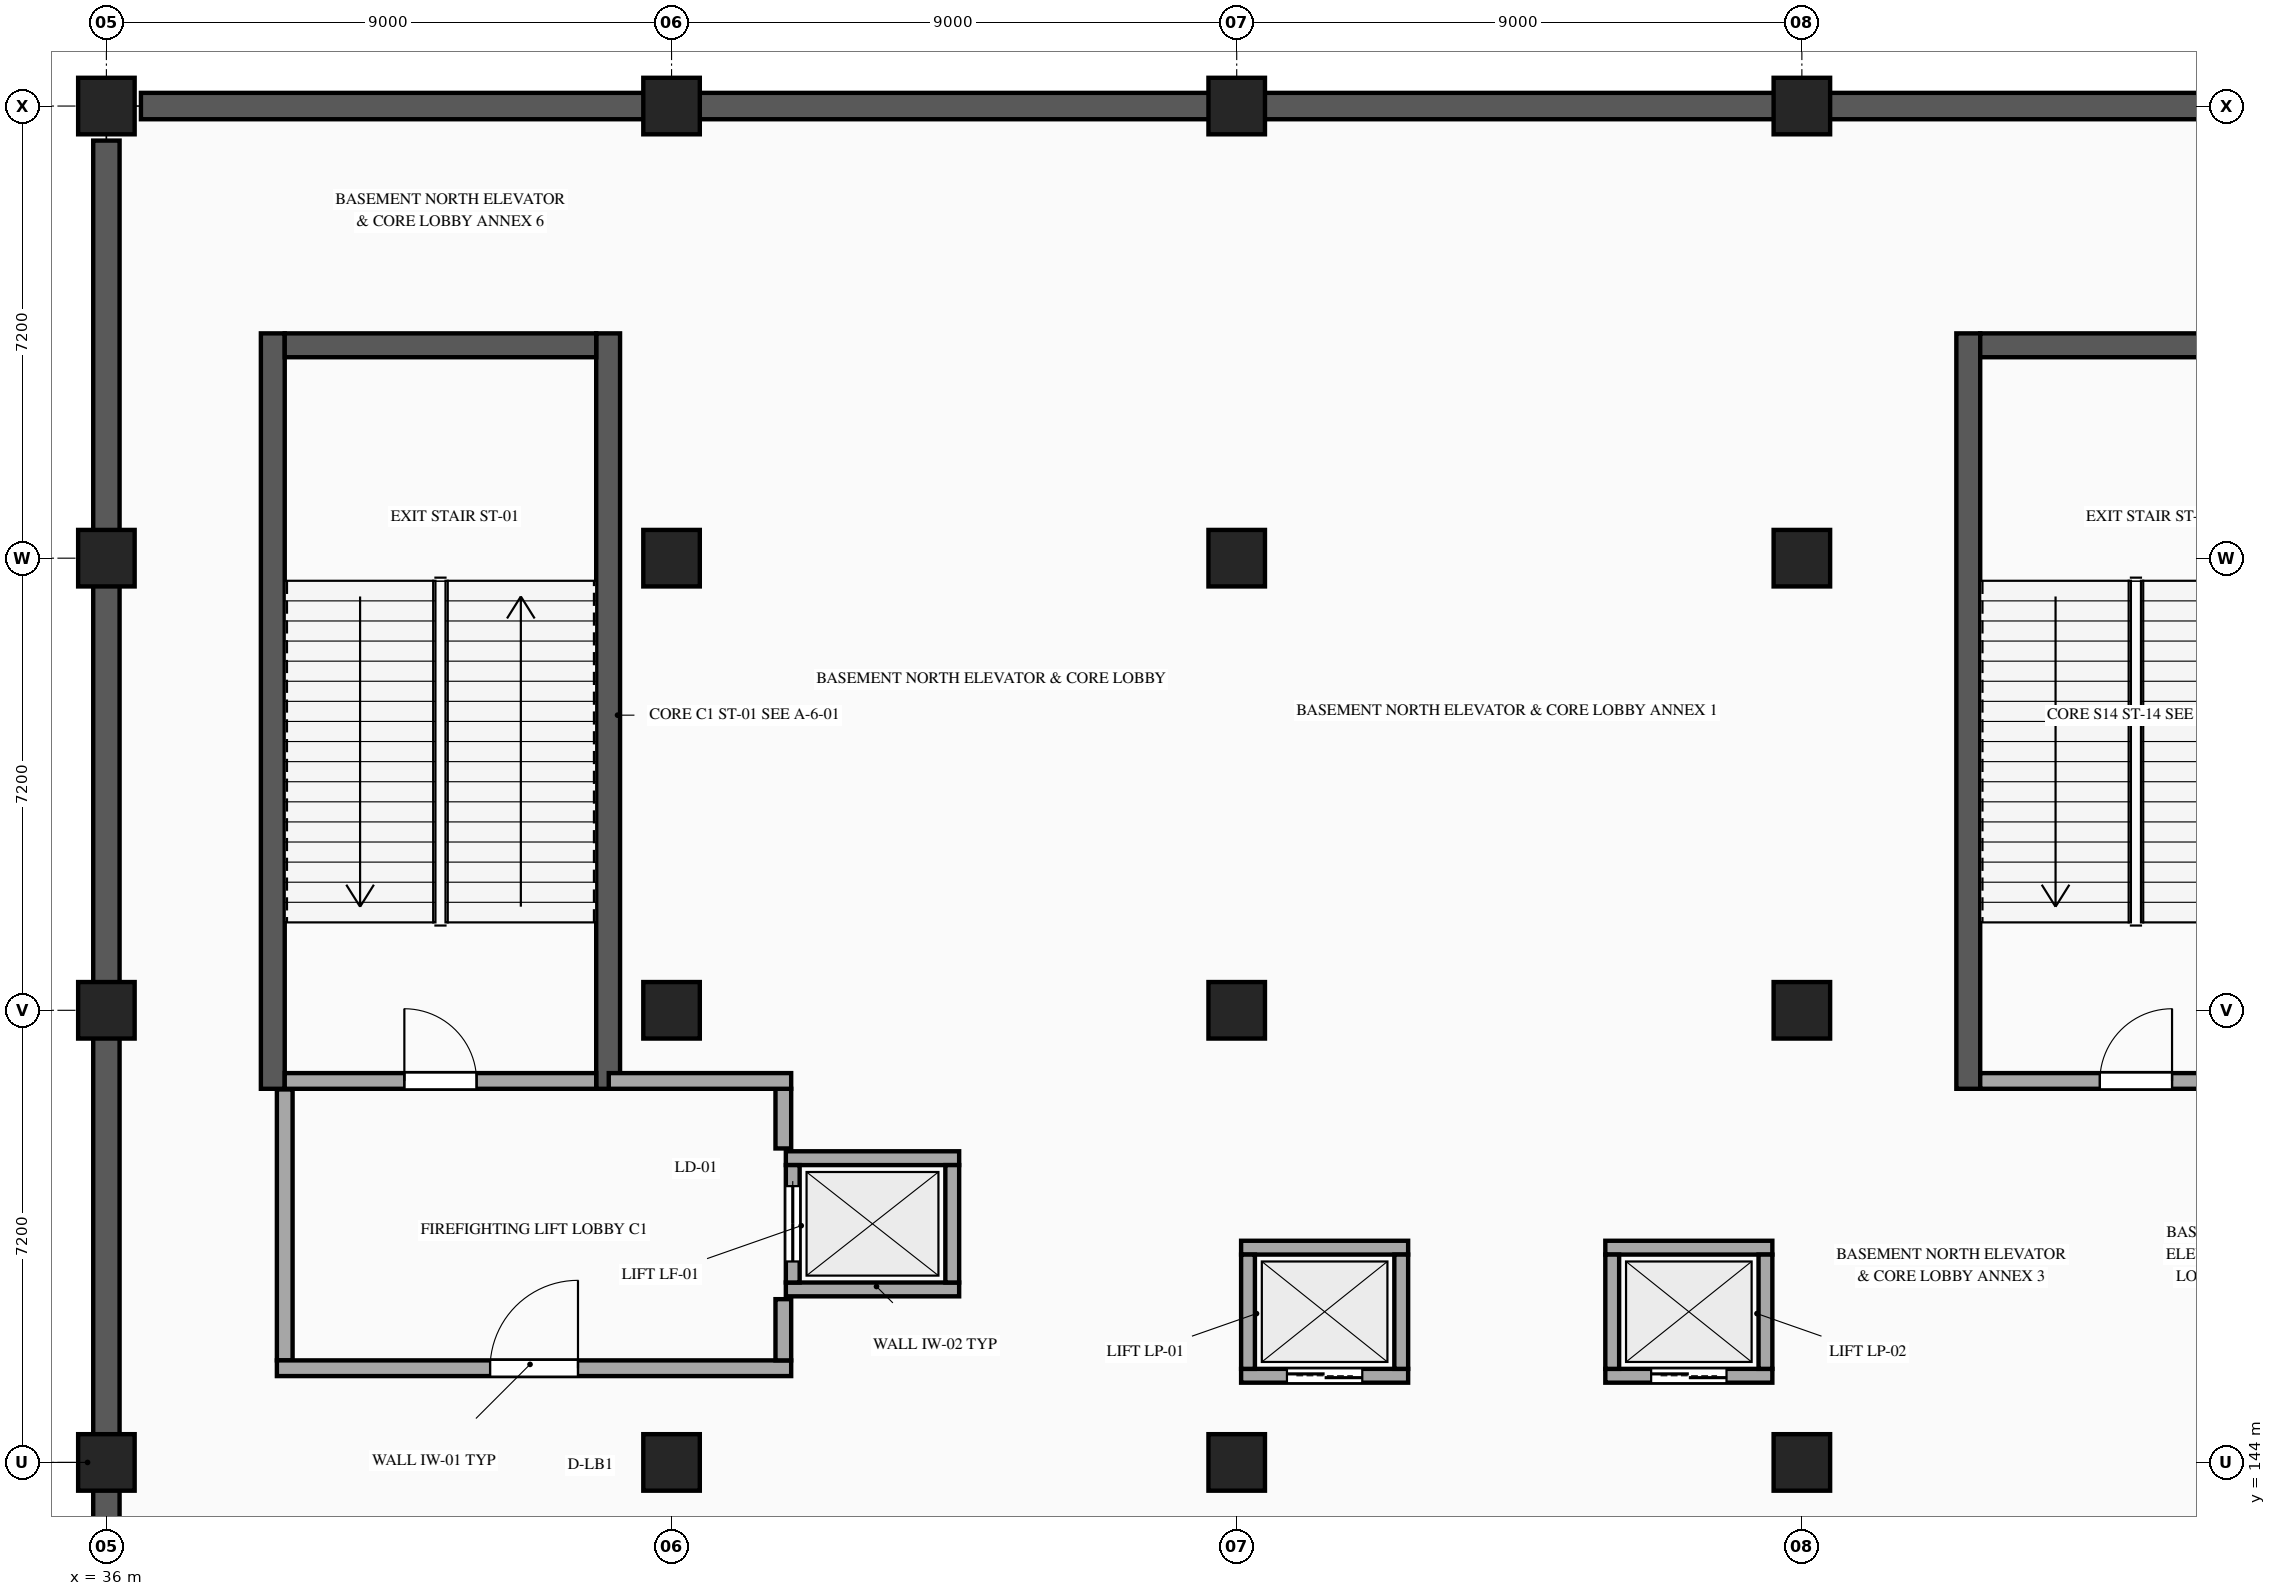
"""IFC4 building model, lengths in metres.
Left out: names, types, materials, properties, quantities, classifications, styles, units other than length and angle.
Written with IfcOpenShell. Run it as: python <this file> out.ifc"""

import sys

from ifc_helpers import new_model, si_unit, direction, frame, frame_2d, origin, origin_2d, place, context, subcontext, project, spatial, rectangle, extrude, element, fill, save


model = new_model("IFC4")
c1 = context("Model", 3, precision=1e-05, world=origin(), true_north=direction((0.0, 1.0)))
c2 = subcontext(c1, "Body", "Model", "MODEL_VIEW")
j1 = project(units=[si_unit("LENGTHUNIT", "METRE"), si_unit("PLANEANGLEUNIT", "RADIAN")], contexts=[c1])
p1 = place(None, origin())
s1 = spatial("IfcSite", under=j1, at=p1, CompositionType="ELEMENT")
p2 = place(p1, origin())
s2 = spatial("IfcBuilding", under=s1, at=p2, CompositionType="ELEMENT")
p3 = place(p2, frame((0.0, 0.0, -5.4)))
s3 = spatial("IfcBuildingStorey", under=s2, at=p3, CompositionType="ELEMENT", Elevation=-5.4)
for number, where, z_axis, x_axis in (
    (1, (36.0, 144.0, 0.0), (0.0, 0.0, 1.0), (1.0, 0.0, 0.0)),
    (2, (36.0, 151.2, 0.0), (0.0, 0.0, 1.0), (1.0, 0.0, 0.0)),
    (3, (36.0, 158.4, 0.0), (0.0, 0.0, 1.0), (1.0, 0.0, 0.0)),
    (4, (36.0, 165.6, 0.0), (0.0, 0.0, 1.0), (1.0, 0.0, 0.0)),
    (5, (45.0, 144.0, 0.0), (0.0, 0.0, 1.0), (1.0, 0.0, 0.0)),
    (6, (45.0, 151.2, 0.0), (0.0, 0.0, 1.0), (1.0, 0.0, 0.0)),
    (7, (45.0, 158.4, 0.0), (0.0, 0.0, 1.0), (1.0, 0.0, 0.0)),
    (8, (45.0, 165.6, 0.0), (0.0, 0.0, 1.0), (1.0, 0.0, 0.0)),
    (9, (54.0, 144.0, 0.0), (0.0, 0.0, 1.0), (1.0, 0.0, 0.0)),
    (10, (54.0, 151.2, 0.0), (0.0, 0.0, 1.0), (1.0, 0.0, 0.0)),
    (11, (54.0, 158.4, 0.0), (0.0, 0.0, 1.0), (1.0, 0.0, 0.0)),
    (12, (54.0, 165.6, 0.0), (0.0, 0.0, 1.0), (1.0, 0.0, 0.0)),
    (13, (63.0, 144.0, 0.0), (0.0, 0.0, 1.0), (1.0, 0.0, 0.0)),
    (14, (63.0, 151.2, 0.0), (0.0, 0.0, 1.0), (1.0, 0.0, 0.0)),
    (15, (63.0, 158.4, 0.0), (0.0, 0.0, 1.0), (1.0, 0.0, 0.0)),
    (16, (63.0, 165.6, 0.0), (0.0, 0.0, 1.0), (1.0, 0.0, 0.0)),
):
    element("IfcColumn", number, at=place(p3, frame(where, z_axis=z_axis, x_axis=x_axis)), inside=s3, PredefinedType="COLUMN", context=c2, shape_type="SweptSolid", body=[
        extrude(rectangle(XDim=0.9, YDim=0.9, at=origin_2d()), origin(), (0.0, 0.0, 1.0), 5.4),
    ])
p4 = place(p3, frame((36.0, 122.95, 0.0), z_axis=(0.0, 0.0, 1.0), x_axis=(0.0, 1.0, 0.0)))
e17 = element("IfcWall", 17, at=p4, inside=s3, PredefinedType="USERDEFINED", context=c2, shape_type="SweptSolid", body=[
    extrude(rectangle(XDim=42.1, YDim=0.42, at=frame_2d((21.05, 0.0))), origin(), (0.0, 0.0, 1.0), 4.08),
])
p5 = place(p3, frame((36.55, 165.6, 0.0), z_axis=(0.0, 0.0, 1.0), x_axis=(1.0, 0.0, 0.0)))
e18 = element("IfcWall", 18, at=p5, inside=s3, PredefinedType="USERDEFINED", context=c2, shape_type="SweptSolid", body=[
    extrude(rectangle(XDim=61.9, YDim=0.42, at=frame_2d((30.95, 0.0))), origin(), (0.0, 0.0, 1.0), 4.08),
])
for number, where, z_axis, x_axis in (
    (19, (38.65, 149.95, 0.0), (0.0, 0.0, 1.0), (0.0, 1.0, 0.0)),
    (20, (43.99, 161.98, 0.0), (0.0, 0.0, 1.0), (0.0, -1.0, 0.0)),
):
    element("IfcWall", number, at=place(p3, frame(where, z_axis=z_axis, x_axis=x_axis)), inside=s3, PredefinedType="SHEAR", context=c2, shape_type="SweptSolid", body=[
        extrude(rectangle(XDim=12.03, YDim=0.38, at=frame_2d((6.015, 0.0))), origin(), (0.0, 0.0, 1.0), 5.08),
    ])
p6 = place(p3, frame((38.84, 161.79, 0.0), z_axis=(0.0, 0.0, 1.0), x_axis=(1.0, 0.0, 0.0)))
e21 = element("IfcWall", 21, at=p6, inside=s3, PredefinedType="SHEAR", context=c2, shape_type="SweptSolid", body=[
    extrude(rectangle(XDim=4.96, YDim=0.38, at=frame_2d((2.48, 0.0))), origin(), (0.0, 0.0, 1.0), 5.08),
])
p7 = place(p3, frame((65.65, 149.95, 0.0), z_axis=(0.0, 0.0, 1.0), x_axis=(0.0, 1.0, 0.0)))
e22 = element("IfcWall", 22, at=p7, inside=s3, PredefinedType="SHEAR", context=c2, shape_type="SweptSolid", body=[
    extrude(rectangle(XDim=12.03, YDim=0.38, at=frame_2d((6.015, 0.0))), origin(), (0.0, 0.0, 1.0), 5.08),
])
p8 = place(p3, frame((65.84, 161.79, 0.0), z_axis=(0.0, 0.0, 1.0), x_axis=(1.0, 0.0, 0.0)))
e23 = element("IfcWall", 23, at=p8, inside=s3, PredefinedType="SHEAR", context=c2, shape_type="SweptSolid", body=[
    extrude(rectangle(XDim=4.96, YDim=0.38, at=frame_2d((2.48, 0.0))), origin(), (0.0, 0.0, 1.0), 5.08),
])
p9 = place(p3, frame((38.84, 150.075, 0.0), z_axis=(0.0, 0.0, 1.0), x_axis=(1.0, 0.0, 0.0)))
e24 = element("IfcWall", 24, at=p9, inside=s3, PredefinedType="STANDARD", context=c2, shape_type="SweptSolid", body=[
    extrude(rectangle(XDim=4.96, YDim=0.25, at=frame_2d((2.48, 0.0))), origin(), (0.0, 0.0, 1.0), 4.95),
])
p10 = place(p9, frame((1.905, 0.0, 0.0)))
e25 = element("IfcOpeningElement", 25, at=p10, cuts=e24, PredefinedType="OPENING", context=c2, shape_type="SweptSolid", body=[
    extrude(rectangle(XDim=1.15, YDim=2.2, at=frame_2d((0.575, 1.1))), frame((0.0, 0.135, 0.0), z_axis=(0.0, -1.0, 0.0), x_axis=(1.0, 0.0, 0.0)), (0.0, 0.0, 1.0), 0.27),
])
for number, where, z_axis, x_axis in (
    (26, (46.82, 146.755, 0.0), (0.0, 0.0, 1.0), (1.0, 0.0, 0.0)),
    (27, (49.58, 148.845, 0.0), (0.0, 0.0, 1.0), (-1.0, 0.0, 0.0)),
):
    element("IfcWall", number, at=place(p3, frame(where, z_axis=z_axis, x_axis=x_axis)), inside=s3, PredefinedType="STANDARD", context=c2, shape_type="SweptSolid", body=[
        extrude(rectangle(XDim=2.76, YDim=0.22, at=frame_2d((1.38, 0.0))), origin(), (0.0, 0.0, 1.0), 4.95),
    ])
p11 = place(p3, frame((46.93, 148.735, 0.0), z_axis=(0.0, 0.0, 1.0), x_axis=(0.0, -1.0, 0.0)))
e28 = element("IfcWall", 28, at=p11, inside=s3, PredefinedType="STANDARD", context=c2, shape_type="SweptSolid", body=[
    extrude(rectangle(XDim=1.87, YDim=0.22, at=frame_2d((0.935, 0.0))), origin(), (0.0, 0.0, 1.0), 4.95),
])
p12 = place(p11, frame((0.335, 0.0, 0.0)))
e29 = element("IfcOpeningElement", 29, at=p12, cuts=e28, PredefinedType="OPENING", context=c2, shape_type="SweptSolid", body=[
    extrude(rectangle(XDim=1.2, YDim=2.2, at=frame_2d((0.6, 1.1))), frame((0.0, 0.12, 0.0), z_axis=(0.0, -1.0, 0.0), x_axis=(1.0, 0.0, 0.0)), (0.0, 0.0, 1.0), 0.24),
])
p13 = place(p3, frame((49.47, 146.865, 0.0), z_axis=(0.0, 0.0, 1.0), x_axis=(0.0, 1.0, 0.0)))
e30 = element("IfcWall", 30, at=p13, inside=s3, PredefinedType="STANDARD", context=c2, shape_type="SweptSolid", body=[
    extrude(rectangle(XDim=1.87, YDim=0.22, at=frame_2d((0.935, 0.0))), origin(), (0.0, 0.0, 1.0), 4.95),
])
p14 = place(p3, frame((54.07, 145.38, 0.0), z_axis=(0.0, 0.0, 1.0), x_axis=(1.0, 0.0, 0.0)))
e31 = element("IfcWall", 31, at=p14, inside=s3, PredefinedType="STANDARD", context=c2, shape_type="SweptSolid", body=[
    extrude(rectangle(XDim=2.66, YDim=0.22, at=frame_2d((1.33, 0.0))), origin(), (0.0, 0.0, 1.0), 4.397),
])
p15 = place(p14, frame((0.73, 0.0, 0.0)))
e32 = element("IfcOpeningElement", 32, at=p15, cuts=e31, PredefinedType="OPENING", context=c2, shape_type="SweptSolid", body=[
    extrude(rectangle(XDim=1.2, YDim=2.2, at=frame_2d((0.6, 1.1))), frame((0.0, 0.12, 0.0), z_axis=(0.0, -1.0, 0.0), x_axis=(1.0, 0.0, 0.0)), (0.0, 0.0, 1.0), 0.24),
])
p16 = place(p3, frame((56.73, 147.42, 0.0), z_axis=(0.0, 0.0, 1.0), x_axis=(-1.0, 0.0, 0.0)))
e33 = element("IfcWall", 33, at=p16, inside=s3, PredefinedType="STANDARD", context=c2, shape_type="SweptSolid", body=[
    extrude(rectangle(XDim=2.66, YDim=0.22, at=frame_2d((1.33, 0.0))), origin(), (0.0, 0.0, 1.0), 4.397),
])
for number, where, z_axis, x_axis in (
    (34, (54.18, 147.31, 0.0), (0.0, 0.0, 1.0), (0.0, -1.0, 0.0)),
    (35, (56.62, 145.49, 0.0), (0.0, 0.0, 1.0), (0.0, 1.0, 0.0)),
):
    element("IfcWall", number, at=place(p3, frame(where, z_axis=z_axis, x_axis=x_axis)), inside=s3, PredefinedType="STANDARD", context=c2, shape_type="SweptSolid", body=[
        extrude(rectangle(XDim=1.82, YDim=0.22, at=frame_2d((0.91, 0.0))), origin(), (0.0, 0.0, 1.0), 4.397),
    ])
p17 = place(p3, frame((59.87, 145.38, 0.0), z_axis=(0.0, 0.0, 1.0), x_axis=(1.0, 0.0, 0.0)))
e36 = element("IfcWall", 36, at=p17, inside=s3, PredefinedType="STANDARD", context=c2, shape_type="SweptSolid", body=[
    extrude(rectangle(XDim=2.66, YDim=0.22, at=frame_2d((1.33, 0.0))), origin(), (0.0, 0.0, 1.0), 4.95),
])
p18 = place(p17, frame((0.73, 0.0, 0.0)))
e37 = element("IfcOpeningElement", 37, at=p18, cuts=e36, PredefinedType="OPENING", context=c2, shape_type="SweptSolid", body=[
    extrude(rectangle(XDim=1.2, YDim=2.2, at=frame_2d((0.6, 1.1))), frame((0.0, 0.12, 0.0), z_axis=(0.0, -1.0, 0.0), x_axis=(1.0, 0.0, 0.0)), (0.0, 0.0, 1.0), 0.24),
])
p19 = place(p3, frame((62.53, 147.42, 0.0), z_axis=(0.0, 0.0, 1.0), x_axis=(-1.0, 0.0, 0.0)))
e38 = element("IfcWall", 38, at=p19, inside=s3, PredefinedType="STANDARD", context=c2, shape_type="SweptSolid", body=[
    extrude(rectangle(XDim=2.66, YDim=0.22, at=frame_2d((1.33, 0.0))), origin(), (0.0, 0.0, 1.0), 4.95),
])
for number, where, z_axis, x_axis in (
    (39, (59.98, 147.31, 0.0), (0.0, 0.0, 1.0), (0.0, -1.0, 0.0)),
    (40, (62.42, 145.49, 0.0), (0.0, 0.0, 1.0), (0.0, 1.0, 0.0)),
):
    element("IfcWall", number, at=place(p3, frame(where, z_axis=z_axis, x_axis=x_axis)), inside=s3, PredefinedType="STANDARD", context=c2, shape_type="SweptSolid", body=[
        extrude(rectangle(XDim=1.82, YDim=0.22, at=frame_2d((0.91, 0.0))), origin(), (0.0, 0.0, 1.0), 4.95),
    ])
p20 = place(p3, frame((65.84, 150.075, 0.0), z_axis=(0.0, 0.0, 1.0), x_axis=(1.0, 0.0, 0.0)))
e41 = element("IfcWall", 41, at=p20, inside=s3, PredefinedType="STANDARD", context=c2, shape_type="SweptSolid", body=[
    extrude(rectangle(XDim=4.96, YDim=0.25, at=frame_2d((2.48, 0.0))), origin(), (0.0, 0.0, 1.0), 4.95),
])
p21 = place(p20, frame((1.905, 0.0, 0.0)))
e42 = element("IfcOpeningElement", 42, at=p21, cuts=e41, PredefinedType="OPENING", context=c2, shape_type="SweptSolid", body=[
    extrude(rectangle(XDim=1.15, YDim=2.2, at=frame_2d((0.575, 1.1))), frame((0.0, 0.135, 0.0), z_axis=(0.0, -1.0, 0.0), x_axis=(1.0, 0.0, 0.0)), (0.0, 0.0, 1.0), 0.27),
])
p22 = place(p3, frame((38.84, 149.94, 0.0), z_axis=(0.0, 0.0, 1.0), x_axis=(0.0, -1.0, 0.0)))
e43 = element("IfcWall", 43, at=p22, inside=s3, PredefinedType="STANDARD", context=c2, shape_type="SweptSolid", body=[
    extrude(rectangle(XDim=4.315, YDim=0.25, at=frame_2d((2.157, 0.0))), origin(), (0.0, 0.0, 1.0), 4.397),
])
p23 = place(p3, frame((38.715, 145.5, 0.0), z_axis=(0.0, 0.0, 1.0), x_axis=(1.0, 0.0, 0.0)))
e44 = element("IfcWall", 44, at=p23, inside=s3, PredefinedType="STANDARD", context=c2, shape_type="SweptSolid", body=[
    extrude(rectangle(XDim=8.19, YDim=0.25, at=frame_2d((4.095, 0.0))), origin(), (0.0, 0.0, 1.0), 4.397),
])
p24 = place(p23, frame((3.395, 0.0, 0.0)))
e45 = element("IfcOpeningElement", 45, at=p24, cuts=e44, PredefinedType="OPENING", context=c2, shape_type="SweptSolid", body=[
    extrude(rectangle(XDim=1.4, YDim=2.2, at=frame_2d((0.7, 1.1))), frame((0.0, 0.135, 0.0), z_axis=(0.0, -1.0, 0.0), x_axis=(1.0, 0.0, 0.0)), (0.0, 0.0, 1.0), 0.27),
])
p25 = place(p3, frame((46.78, 145.625, 0.0), z_axis=(0.0, 0.0, 1.0), x_axis=(0.0, 1.0, 0.0)))
e46 = element("IfcWall", 46, at=p25, inside=s3, PredefinedType="STANDARD", context=c2, shape_type="SweptSolid", body=[
    extrude(rectangle(XDim=0.975, YDim=0.25, at=frame_2d((0.488, 0.0))), origin(), (0.0, 0.0, 1.0), 4.397),
])
p26 = place(p3, frame((46.78, 149.0, 0.0), z_axis=(0.0, 0.0, 1.0), x_axis=(0.0, 1.0, 0.0)))
e47 = element("IfcWall", 47, at=p26, inside=s3, PredefinedType="STANDARD", context=c2, shape_type="SweptSolid", body=[
    extrude(rectangle(XDim=0.95, YDim=0.25, at=frame_2d((0.475, 0.0))), origin(), (0.0, 0.0, 1.0), 4.397),
])
p27 = place(p3, frame((44.0, 150.075, 0.0), z_axis=(0.0, 0.0, 1.0), x_axis=(1.0, 0.0, 0.0)))
e48 = element("IfcWall", 48, at=p27, inside=s3, PredefinedType="STANDARD", context=c2, shape_type="SweptSolid", body=[
    extrude(rectangle(XDim=2.905, YDim=0.25, at=frame_2d((1.453, 0.0))), origin(), (0.0, 0.0, 1.0), 4.397),
])
p28 = place(p10, origin())
e49 = element("IfcDoor", 49, at=p28, inside=s3, OperationType="SINGLE_SWING_LEFT", PredefinedType="DOOR", context=c2, shape_type="SweptSolid", body=[
    extrude(rectangle(XDim=1.15, YDim=2.2, at=frame_2d((0.575, 1.1))), frame((0.0, 0.025, 0.0), z_axis=(0.0, -1.0, 0.0), x_axis=(1.0, 0.0, 0.0)), (0.0, 0.0, 1.0), 0.05),
])
fill(e25, e49)
p29 = place(p12, origin())
e50 = element("IfcDoor", 50, at=p29, inside=s3, OperationType="DOUBLE_DOOR_SLIDING", PredefinedType="DOOR", context=c2, shape_type="SweptSolid", body=[
    extrude(rectangle(XDim=1.2, YDim=2.2, at=frame_2d((0.6, 1.1))), frame((0.0, 0.025, 0.0), z_axis=(0.0, -1.0, 0.0), x_axis=(1.0, 0.0, 0.0)), (0.0, 0.0, 1.0), 0.05),
])
fill(e29, e50)
p30 = place(p15, origin())
e51 = element("IfcDoor", 51, at=p30, inside=s3, OperationType="DOUBLE_DOOR_SLIDING", PredefinedType="DOOR", context=c2, shape_type="SweptSolid", body=[
    extrude(rectangle(XDim=1.2, YDim=2.2, at=frame_2d((0.6, 1.1))), frame((0.0, 0.025, 0.0), z_axis=(0.0, -1.0, 0.0), x_axis=(1.0, 0.0, 0.0)), (0.0, 0.0, 1.0), 0.05),
])
fill(e32, e51)
p31 = place(p18, origin())
e52 = element("IfcDoor", 52, at=p31, inside=s3, OperationType="DOUBLE_DOOR_SLIDING", PredefinedType="DOOR", context=c2, shape_type="SweptSolid", body=[
    extrude(rectangle(XDim=1.2, YDim=2.2, at=frame_2d((0.6, 1.1))), frame((0.0, 0.025, 0.0), z_axis=(0.0, -1.0, 0.0), x_axis=(1.0, 0.0, 0.0)), (0.0, 0.0, 1.0), 0.05),
])
fill(e37, e52)
p32 = place(p21, origin())
e53 = element("IfcDoor", 53, at=p32, inside=s3, OperationType="SINGLE_SWING_RIGHT", PredefinedType="DOOR", context=c2, shape_type="SweptSolid", body=[
    extrude(rectangle(XDim=1.15, YDim=2.2, at=frame_2d((0.575, 1.1))), frame((0.0, 0.025, 0.0), z_axis=(0.0, -1.0, 0.0), x_axis=(1.0, 0.0, 0.0)), (0.0, 0.0, 1.0), 0.05),
])
fill(e42, e53)
p33 = place(p24, origin())
e54 = element("IfcDoor", 54, at=p33, inside=s3, OperationType="SINGLE_SWING_RIGHT", PredefinedType="DOOR", context=c2, shape_type="SweptSolid", body=[
    extrude(rectangle(XDim=1.4, YDim=2.2, at=frame_2d((0.7, 1.1))), frame((0.0, 0.025, 0.0), z_axis=(0.0, -1.0, 0.0), x_axis=(1.0, 0.0, 0.0)), (0.0, 0.0, 1.0), 0.05),
])
fill(e45, e54)
save(model, sys.argv[1])
